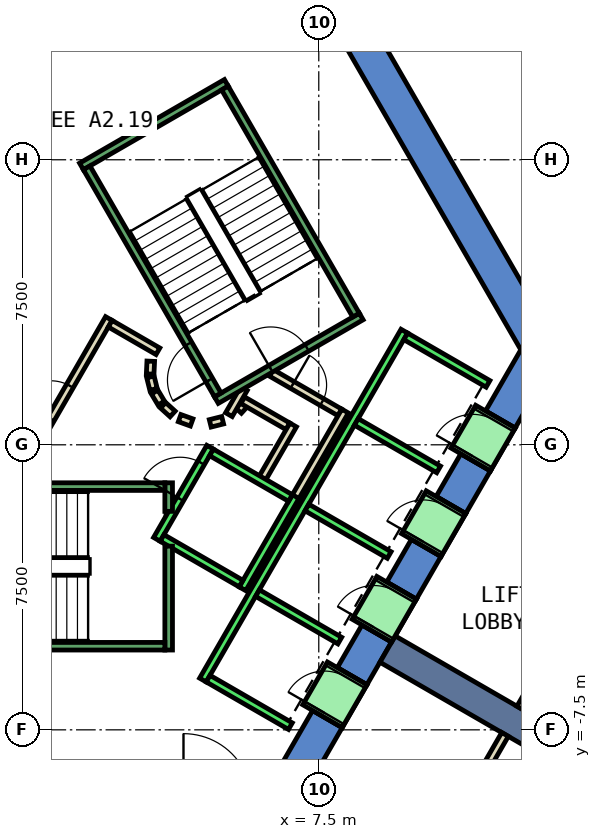
"""IFC4 building model, lengths in metres.
Left out: names, types, materials, properties, quantities, classifications, styles, units other than length and angle.
Written with IfcOpenShell. Run it as: python <this file> out.ifc"""

import sys

from ifc_helpers import new_model, si_unit, direction, frame, frame_2d, origin, place, context, subcontext, project, spatial, polyline, rectangle, outline, extrude, element, fill, save


model = new_model("IFC4")
c1 = context("Model", 3, precision=1e-05, world=origin(), true_north=direction((0.0, 1.0)))
c2 = subcontext(c1, "Body", "Model", "MODEL_VIEW")
j1 = project(units=[si_unit("LENGTHUNIT", "METRE"), si_unit("PLANEANGLEUNIT", "RADIAN")], contexts=[c1])
p1 = place(None, origin())
s1 = spatial("IfcSite", under=j1, at=p1, CompositionType="ELEMENT")
p2 = place(p1, origin())
s2 = spatial("IfcBuilding", under=s1, at=p2, CompositionType="ELEMENT")
p3 = place(p2, frame((0.0, 0.0, 86.6)))
s3 = spatial("IfcBuildingStorey", under=s2, at=p3, CompositionType="ELEMENT", Elevation=86.6)
p4 = place(p3, frame((0.0, 0.0, -0.6)))
e1 = element("IfcWall", 1, at=p4, inside=s3, PredefinedType="SHEAR", context=c2, shape_type="SweptSolid", body=[
    extrude(outline(polyline([(8.517, 11.748), (7.738, 11.298), (12.817, 2.5), (13.856, 2.5), (8.517, 11.748)])), origin(), (0.0, 0.0, 1.0), 4.4),
])
p5 = place(p3, frame((0.0, 0.0, -0.6)))
e2 = element("IfcWall", 2, at=p5, inside=s3, PredefinedType="SHEAR", context=c2, shape_type="SweptSolid", body=[
    extrude(outline(polyline([(8.117, -7.44), (7.338, -6.99), (6.409, -8.6), (6.928, -9.5), (8.117, -7.44)])), origin(), (0.0, 0.0, 1.0), 4.4),
])
p6 = place(p3, frame((0.0, 0.0, -0.6)))
e3 = element("IfcWall", 3, at=p6, inside=s3, PredefinedType="SHEAR", context=c2, shape_type="SweptSolid", body=[
    extrude(outline(polyline([(9.417, -5.189), (8.638, -4.739), (7.988, -5.864), (8.767, -6.314), (9.417, -5.189)])), origin(), (0.0, 0.0, 1.0), 4.4),
])
p7 = place(p3, frame((0.0, 0.0, -0.6)))
e4 = element("IfcWall", 4, at=p7, inside=s3, PredefinedType="SHEAR", context=c2, shape_type="SweptSolid", body=[
    extrude(outline(polyline([(10.717, -2.937), (9.938, -2.487), (9.288, -3.613), (10.067, -4.063), (10.717, -2.937)])), origin(), (0.0, 0.0, 1.0), 4.4),
])
p8 = place(p3, frame((0.0, 0.0, -0.6)))
e5 = element("IfcWall", 5, at=p8, inside=s3, PredefinedType="SHEAR", context=c2, shape_type="SweptSolid", body=[
    extrude(outline(polyline([(12.017, -0.686), (11.238, -0.236), (10.588, -1.361), (11.367, -1.811), (12.017, -0.686)])), origin(), (0.0, 0.0, 1.0), 4.4),
])
p9 = place(p3, frame((0.0, 0.0, -0.6)))
e6 = element("IfcWall", 6, at=p9, inside=s3, PredefinedType="SHEAR", context=c2, shape_type="SweptSolid", body=[
    extrude(outline(polyline([(11.888, 0.89), (12.667, 0.44), (13.856, 2.5), (12.817, 2.5), (11.888, 0.89)])), origin(), (0.0, 0.0, 1.0), 4.4),
])
p10 = place(p3, frame((0.0, 0.0, 3.6)))
e7 = element("IfcWall", 7, at=p10, inside=s3, PredefinedType="SHEAR", context=c2, shape_type="SweptSolid", body=[
    extrude(outline(polyline([(8.767, -6.314), (7.988, -5.864), (7.338, -6.99), (8.117, -7.44), (8.767, -6.314)])), origin(), (0.0, 0.0, 1.0), 0.2),
])
p11 = place(p3, frame((0.0, 0.0, 3.6)))
e8 = element("IfcWall", 8, at=p11, inside=s3, PredefinedType="SHEAR", context=c2, shape_type="SweptSolid", body=[
    extrude(outline(polyline([(10.067, -4.063), (9.288, -3.613), (8.638, -4.739), (9.417, -5.189), (10.067, -4.063)])), origin(), (0.0, 0.0, 1.0), 0.2),
])
p12 = place(p3, frame((0.0, 0.0, 3.6)))
e9 = element("IfcWall", 9, at=p12, inside=s3, PredefinedType="SHEAR", context=c2, shape_type="SweptSolid", body=[
    extrude(outline(polyline([(11.367, -1.811), (10.588, -1.361), (9.938, -2.487), (10.717, -2.937), (11.367, -1.811)])), origin(), (0.0, 0.0, 1.0), 0.2),
])
p13 = place(p3, frame((0.0, 0.0, 3.6)))
e10 = element("IfcWall", 10, at=p13, inside=s3, PredefinedType="SHEAR", context=c2, shape_type="SweptSolid", body=[
    extrude(outline(polyline([(12.667, 0.44), (11.888, 0.89), (11.238, -0.236), (12.017, -0.686), (12.667, 0.44)])), origin(), (0.0, 0.0, 1.0), 0.2),
])
p14 = place(p3, frame((9.31, -5.375, -0.6), z_axis=(0.0, 0.0, 1.0), x_axis=(0.866017533419, -0.500013631625, 0.0)))
e11 = element("IfcWall", 11, at=p14, inside=s3, PredefinedType="SHEAR", context=c2, shape_type="SweptSolid", body=[
    extrude(rectangle(XDim=9.0, YDim=0.8, at=frame_2d((4.5, 0.0))), origin(), (0.0, 0.0, 1.0), 4.4),
])
p15 = place(p3, frame((12.652, 15.602, 0.0), z_axis=(0.0, 0.0, 1.0), x_axis=(0.504914693075, -0.863169249172, 0.0)))
e12 = element("IfcWall", 12, at=p15, inside=s3, PredefinedType="PARTITIONING", context=c2, shape_type="SweptSolid", body=[
    extrude(rectangle(XDim=7.11, YDim=0.2, at=frame_2d((3.555, 0.0))), origin(), (0.0, 0.0, 1.0), 3.8),
])
p16 = place(p15, frame((3.13, 0.0, 0.0)))
e13 = element("IfcOpeningElement", 13, at=p16, cuts=e12, PredefinedType="OPENING", context=c2, shape_type="SweptSolid", body=[
    extrude(rectangle(XDim=1.0, YDim=2.1, at=frame_2d((0.5, 1.05))), frame((0.0, 0.11, 0.0), z_axis=(0.0, -1.0, 0.0), x_axis=(1.0, 0.0, 0.0)), (0.0, 0.0, 1.0), 0.22),
])
p17 = place(p3, frame((5.39, 0.898, 0.0), z_axis=(0.0, 0.0, 1.0), x_axis=(0.673828488714, 0.738887791073, 0.0)))
e14 = element("IfcWall", 14, at=p17, inside=s3, PredefinedType="PARTITIONING", context=c2, shape_type="SweptSolid", body=[
    extrude(rectangle(XDim=0.263, YDim=0.2, at=frame_2d((0.131, 0.0))), origin(), (0.0, 0.0, 1.0), 3.8),
])
p18 = place(p3, frame((5.499, 1.172, 0.0), z_axis=(0.0, 0.0, 1.0), x_axis=(0.866333505267, -0.499465972466, 0.0)))
e15 = element("IfcWall", 15, at=p18, inside=s3, PredefinedType="PARTITIONING", context=c2, shape_type="SweptSolid", body=[
    extrude(rectangle(XDim=1.374, YDim=0.2, at=frame_2d((0.687, 0.0))), origin(), (0.0, 0.0, 1.0), 3.8),
])
p19 = place(p3, frame((6.826, 0.522, 0.0), z_axis=(0.0, 0.0, 1.0), x_axis=(-0.500016722714, -0.866015748706, 0.0)))
e16 = element("IfcWall", 16, at=p19, inside=s3, PredefinedType="PARTITIONING", context=c2, shape_type="SweptSolid", body=[
    extrude(rectangle(XDim=1.7, YDim=0.2, at=frame_2d((0.85, 0.0))), origin(), (0.0, 0.0, 1.0), 3.8),
])
p20 = place(p3, frame((6.25, 1.894, 0.0), z_axis=(0.0, 0.0, 1.0), x_axis=(0.866043184279, -0.499969202016, 0.0)))
e17 = element("IfcWall", 17, at=p20, inside=s3, PredefinedType="PARTITIONING", context=c2, shape_type="SweptSolid", body=[
    extrude(rectangle(XDim=2.084, YDim=0.2, at=frame_2d((1.042, 0.0))), origin(), (0.0, 0.0, 1.0), 3.8),
])
p21 = place(p20, frame((0.642, 0.0, 0.0)))
e18 = element("IfcOpeningElement", 18, at=p21, cuts=e17, PredefinedType="OPENING", context=c2, shape_type="SweptSolid", body=[
    extrude(rectangle(XDim=0.9, YDim=2.1, at=frame_2d((0.45, 1.05))), frame((0.0, 0.11, 0.0), z_axis=(0.0, -1.0, 0.0), x_axis=(1.0, 0.0, 0.0)), (0.0, 0.0, 1.0), 0.22),
])
p22 = place(p3, frame((8.192, 0.888, 0.0), z_axis=(0.0, 0.0, 1.0), x_axis=(-0.499940625693, -0.866059680843, 0.0)))
e19 = element("IfcWall", 19, at=p22, inside=s3, PredefinedType="PARTITIONING", context=c2, shape_type="SweptSolid", body=[
    extrude(rectangle(XDim=2.68, YDim=0.2, at=frame_2d((1.34, 0.0))), origin(), (0.0, 0.0, 1.0), 3.8),
])
p23 = place(p3, frame((5.135, 0.793, 0.0), z_axis=(0.0, 0.0, 1.0), x_axis=(0.499526442893, 0.866298639529, 0.0)))
e20 = element("IfcWall", 20, at=p23, inside=s3, PredefinedType="PARTITIONING", context=c2, shape_type="SweptSolid", body=[
    extrude(rectangle(XDim=0.791, YDim=0.2, at=frame_2d((0.396, 0.0))), origin(), (0.0, 0.0, 1.0), 3.8),
])
p24 = place(p3, frame((-0.52, -1.0, 0.0), z_axis=(0.0, 0.0, 1.0), x_axis=(0.50011622646, 0.865958290007, 0.0)))
e21 = element("IfcWall", 21, at=p24, inside=s3, PredefinedType="PARTITIONING", context=c2, shape_type="SweptSolid", body=[
    extrude(rectangle(XDim=4.991, YDim=0.2, at=frame_2d((2.496, 0.0))), origin(), (0.0, 0.0, 1.0), 3.8),
])
p25 = place(p24, frame((1.945, 0.0, 0.0)))
e22 = element("IfcOpeningElement", 22, at=p25, cuts=e21, PredefinedType="OPENING", context=c2, shape_type="SweptSolid", body=[
    extrude(rectangle(XDim=1.0, YDim=2.1, at=frame_2d((0.5, 1.05))), frame((0.0, 0.11, 0.0), z_axis=(0.0, -1.0, 0.0), x_axis=(1.0, 0.0, 0.0)), (0.0, 0.0, 1.0), 0.22),
])
p26 = place(p3, frame((2.012, 3.186, 0.0), z_axis=(0.0, 0.0, 1.0), x_axis=(0.865891012941, -0.500232699559, 0.0)))
e23 = element("IfcWall", 23, at=p26, inside=s3, PredefinedType="PARTITIONING", context=c2, shape_type="SweptSolid", body=[
    extrude(rectangle(XDim=1.449, YDim=0.2, at=frame_2d((0.725, 0.0))), origin(), (0.0, 0.0, 1.0), 3.8),
])
p27 = place(p3, frame((3.079, 2.199, 0.0), z_axis=(0.0, 0.0, 1.0), x_axis=(-0.047771483479, -0.998858290933, 0.0)))
e24 = element("IfcWall", 24, at=p27, inside=s3, PredefinedType="PARTITIONING", context=c2, shape_type="SweptSolid", body=[
    extrude(rectangle(XDim=0.337, YDim=0.2, at=frame_2d((0.169, 0.0))), origin(), (0.0, 0.0, 1.0), 3.8),
])
p28 = place(p3, frame((3.07, 1.786, 0.0), z_axis=(0.0, 0.0, 1.0), x_axis=(0.242705583207, -0.970099994784, 0.0)))
e25 = element("IfcWall", 25, at=p28, inside=s3, PredefinedType="PARTITIONING", context=c2, shape_type="SweptSolid", body=[
    extrude(rectangle(XDim=0.338, YDim=0.2, at=frame_2d((0.169, 0.0))), origin(), (0.0, 0.0, 1.0), 3.8),
])
for number, where, z_axis, x_axis in (
    (26, (3.182, 1.388, 0.0), (0.0, 0.0, 1.0), (0.512, -0.859, 0.0)),
    (27, (3.404, 1.039, 0.0), (0.0, 0.0, 1.0), (0.74, -0.672, 0.0)),
):
    element("IfcWall", number, at=place(p3, frame(where, z_axis=z_axis, x_axis=x_axis)), inside=s3, PredefinedType="PARTITIONING", context=c2, shape_type="SweptSolid", body=[
        extrude(rectangle(XDim=0.338, YDim=0.2, at=frame_2d((0.169, 0.0))), origin(), (0.0, 0.0, 1.0), 3.8),
    ])
p29 = place(p3, frame((3.838, 0.702, 0.0), z_axis=(0.0, 0.0, 1.0), x_axis=(0.941035081519, -0.338308993895, 0.0)))
e28 = element("IfcWall", 28, at=p29, inside=s3, PredefinedType="PARTITIONING", context=c2, shape_type="SweptSolid", body=[
    extrude(rectangle(XDim=0.337, YDim=0.2, at=frame_2d((0.168, 0.0))), origin(), (0.0, 0.0, 1.0), 3.8),
])
p30 = place(p3, frame((4.644, 0.564, 0.0), z_axis=(0.0, 0.0, 1.0), x_axis=(0.969929076366, 0.243387729394, 0.0)))
e29 = element("IfcWall", 29, at=p30, inside=s3, PredefinedType="PARTITIONING", context=c2, shape_type="SweptSolid", body=[
    extrude(rectangle(XDim=0.337, YDim=0.2, at=frame_2d((0.168, 0.0))), origin(), (0.0, 0.0, 1.0), 3.8),
])
p31 = place(p3, frame((18.009, 2.092, 0.0), z_axis=(0.0, 0.0, 1.0), x_axis=(-0.499980796252, -0.866036490789, 0.0)))
e30 = element("IfcWall", 30, at=p31, inside=s3, PredefinedType="PARTITIONING", context=c2, shape_type="SweptSolid", body=[
    extrude(rectangle(XDim=10.417, YDim=0.2, at=frame_2d((5.208, 0.0))), origin(), (0.0, 0.0, 1.0), 3.8),
])
p32 = place(p3, frame((12.401, -7.621, 0.0), z_axis=(0.0, 0.0, 1.0), x_axis=(-0.499983724212, -0.866034800411, 0.0)))
e31 = element("IfcWall", 31, at=p32, inside=s3, PredefinedType="PARTITIONING", context=c2, shape_type="SweptSolid", body=[
    extrude(rectangle(XDim=9.302, YDim=0.2, at=frame_2d((4.651, 0.0))), origin(), (0.0, 0.0, 1.0), 3.8),
])
p33 = place(p3, frame((3.24, -2.488, 0.0), z_axis=(0.0, 0.0, 1.0), x_axis=(0.49994636267, 0.866056369097, 0.0)))
e32 = element("IfcWall", 32, at=p33, inside=s3, PredefinedType="STANDARD", context=c2, shape_type="SweptSolid", body=[
    extrude(rectangle(XDim=2.8, YDim=0.2, at=frame_2d((1.4, 0.0))), origin(), (0.0, 0.0, 1.0), 3.8),
])
p34 = place(p33, frame((1.225, 0.0, 0.0)))
e33 = element("IfcOpeningElement", 33, at=p34, cuts=e32, PredefinedType="OPENING", context=c2, shape_type="SweptSolid", body=[
    extrude(rectangle(XDim=1.1, YDim=2.1, at=frame_2d((0.55, 1.05))), frame((0.0, 0.11, 0.0), z_axis=(0.0, -1.0, 0.0), x_axis=(1.0, 0.0, 0.0)), (0.0, 0.0, 1.0), 0.22),
])
p35 = place(p3, frame((5.492, -3.788, 0.0), z_axis=(0.0, 0.0, 1.0), x_axis=(0.500011755427, 0.866018616679, 0.0)))
e34 = element("IfcWall", 34, at=p35, inside=s3, PredefinedType="STANDARD", context=c2, shape_type="SweptSolid", body=[
    extrude(rectangle(XDim=2.8, YDim=0.2, at=frame_2d((1.4, 0.0))), origin(), (0.0, 0.0, 1.0), 3.8),
])
p36 = place(p3, frame((3.377, -2.452, 0.0), z_axis=(0.0, 0.0, 1.0), x_axis=(0.865955154139, -0.50012165622, 0.0)))
e35 = element("IfcWall", 35, at=p36, inside=s3, PredefinedType="STANDARD", context=c2, shape_type="SweptSolid", body=[
    extrude(rectangle(XDim=2.4, YDim=0.2, at=frame_2d((1.2, 0.0))), origin(), (0.0, 0.0, 1.0), 3.8),
])
p37 = place(p3, frame((4.677, -0.2, 0.0), z_axis=(0.0, 0.0, 1.0), x_axis=(0.865973769406, -0.500089422704, 0.0)))
e36 = element("IfcWall", 36, at=p37, inside=s3, PredefinedType="STANDARD", context=c2, shape_type="SweptSolid", body=[
    extrude(rectangle(XDim=2.399, YDim=0.2, at=frame_2d((1.2, 0.0))), origin(), (0.0, 0.0, 1.0), 3.8),
])
p38 = place(p3, frame((4.451, -6.19, 0.0), z_axis=(0.0, 0.0, 1.0), x_axis=(0.50000090737, 0.866024879913, 0.0)))
e37 = element("IfcWall", 37, at=p38, inside=s3, PredefinedType="STANDARD", context=c2, shape_type="SweptSolid", body=[
    extrude(rectangle(XDim=10.6, YDim=0.2, at=frame_2d((5.3, 0.0))), origin(), (0.0, 0.0, 1.0), 3.8),
])
for number, where, z_axis, x_axis in (
    (38, (4.588, -6.153, 0.0), (0.0, 0.0, 1.0), (0.866, -0.5, 0.0)),
    (39, (5.888, -3.902, 0.0), (0.0, 0.0, 1.0), (0.866, -0.5, 0.0)),
    (40, (7.188, -1.65, 0.0), (0.0, 0.0, 1.0), (0.866, -0.5, 0.0)),
    (41, (8.488, 0.602, 0.0), (0.0, 0.0, 1.0), (0.866, -0.5, 0.0)),
):
    element("IfcWall", number, at=place(p3, frame(where, z_axis=z_axis, x_axis=x_axis)), inside=s3, PredefinedType="STANDARD", context=c2, shape_type="SweptSolid", body=[
        extrude(rectangle(XDim=2.5, YDim=0.2, at=frame_2d((1.25, 0.0))), origin(), (0.0, 0.0, 1.0), 3.8),
    ])
p39 = place(p3, frame((9.788, 2.853, 0.0), z_axis=(0.0, 0.0, 1.0), x_axis=(0.865998541277, -0.500046524342, 0.0)))
e42 = element("IfcWall", 42, at=p39, inside=s3, PredefinedType="STANDARD", context=c2, shape_type="SweptSolid", body=[
    extrude(rectangle(XDim=2.5, YDim=0.2, at=frame_2d((1.25, 0.0))), origin(), (0.0, 0.0, 1.0), 3.8),
])
p40 = place(p3, frame((7.598, -7.14, 0.0), z_axis=(0.0, 0.0, 1.0), x_axis=(0.500362116554, 0.865816234728, 0.0)))
e43 = element("IfcWall", 43, at=p40, inside=s3, PredefinedType="STANDARD", context=c2, shape_type="SweptSolid", body=[
    extrude(rectangle(XDim=1.299, YDim=1.2, at=frame_2d((0.65, 0.0))), origin(), (0.0, 0.0, 1.0), 2.4),
])
p41 = place(p40, frame((0.1, 0.0, 0.0)))
e44 = element("IfcOpeningElement", 44, at=p41, cuts=e43, PredefinedType="OPENING", context=c2, shape_type="SweptSolid", body=[
    extrude(rectangle(XDim=1.1, YDim=2.3, at=frame_2d((0.55, 1.15))), frame((0.0, 0.61, 0.0), z_axis=(0.0, -1.0, 0.0), x_axis=(1.0, 0.0, 0.0)), (0.0, 0.0, 1.0), 1.22),
])
p42 = place(p3, frame((8.898, -4.889, 0.0), z_axis=(0.0, 0.0, 1.0), x_axis=(0.500036693733, 0.866004217611, 0.0)))
e45 = element("IfcWall", 45, at=p42, inside=s3, PredefinedType="STANDARD", context=c2, shape_type="SweptSolid", body=[
    extrude(rectangle(XDim=1.3, YDim=1.2, at=frame_2d((0.65, 0.0))), origin(), (0.0, 0.0, 1.0), 2.4),
])
p43 = place(p42, frame((0.1, 0.0, 0.0)))
e46 = element("IfcOpeningElement", 46, at=p43, cuts=e45, PredefinedType="OPENING", context=c2, shape_type="SweptSolid", body=[
    extrude(rectangle(XDim=1.1, YDim=2.3, at=frame_2d((0.55, 1.15))), frame((0.0, 0.61, 0.0), z_axis=(0.0, -1.0, 0.0), x_axis=(1.0, 0.0, 0.0)), (0.0, 0.0, 1.0), 1.22),
])
p44 = place(p3, frame((10.198, -2.637, 0.0), z_axis=(0.0, 0.0, 1.0), x_axis=(0.49989585183, 0.866085525409, 0.0)))
e47 = element("IfcWall", 47, at=p44, inside=s3, PredefinedType="STANDARD", context=c2, shape_type="SweptSolid", body=[
    extrude(rectangle(XDim=1.3, YDim=1.2, at=frame_2d((0.65, 0.0))), origin(), (0.0, 0.0, 1.0), 2.4),
])
p45 = place(p44, frame((0.1, 0.0, 0.0)))
e48 = element("IfcOpeningElement", 48, at=p45, cuts=e47, PredefinedType="OPENING", context=c2, shape_type="SweptSolid", body=[
    extrude(rectangle(XDim=1.1, YDim=2.3, at=frame_2d((0.55, 1.15))), frame((0.0, 0.61, 0.0), z_axis=(0.0, -1.0, 0.0), x_axis=(1.0, 0.0, 0.0)), (0.0, 0.0, 1.0), 1.22),
])
p46 = place(p3, frame((11.498, -0.385, 0.0), z_axis=(0.0, 0.0, 1.0), x_axis=(0.500221244143, 0.865897630733, 0.0)))
e49 = element("IfcWall", 49, at=p46, inside=s3, PredefinedType="STANDARD", context=c2, shape_type="SweptSolid", body=[
    extrude(rectangle(XDim=1.299, YDim=1.2, at=frame_2d((0.65, 0.0))), origin(), (0.0, 0.0, 1.0), 2.4),
])
p47 = place(p46, frame((0.1, 0.0, 0.0)))
e50 = element("IfcOpeningElement", 50, at=p47, cuts=e49, PredefinedType="OPENING", context=c2, shape_type="SweptSolid", body=[
    extrude(rectangle(XDim=1.1, YDim=2.3, at=frame_2d((0.55, 1.15))), frame((0.0, 0.61, 0.0), z_axis=(0.0, -1.0, 0.0), x_axis=(1.0, 0.0, 0.0)), (0.0, 0.0, 1.0), 1.22),
])
p48 = place(p3, frame((3.55, -2.667, 0.0), z_axis=(0.0, 0.0, 1.0), x_axis=(0.0, -1.0, 0.0)))
e51 = element("IfcWall", 51, at=p48, inside=s3, PredefinedType="STANDARD", context=c2, shape_type="SweptSolid", body=[
    extrude(rectangle(XDim=2.733, YDim=0.2, at=frame_2d((1.366, 0.0))), origin(), (0.0, 0.0, 1.0), 3.8),
])
p49 = place(p3, frame((3.55, -1.0, 0.0), z_axis=(0.0, 0.0, 1.0), x_axis=(0.0, -1.0, 0.0)))
e52 = element("IfcWall", 52, at=p49, inside=s3, PredefinedType="STANDARD", context=c2, shape_type="SweptSolid", body=[
    extrude(rectangle(XDim=0.751, YDim=0.2, at=frame_2d((0.375, 0.0))), origin(), (0.0, 0.0, 1.0), 3.8),
])
p50 = place(p3, frame((-3.45, -1.1, 0.0), z_axis=(0.0, 0.0, 1.0), x_axis=(1.0, 0.0, 0.0)))
e53 = element("IfcWall", 53, at=p50, inside=s3, PredefinedType="STANDARD", context=c2, shape_type="SweptSolid", body=[
    extrude(rectangle(XDim=6.9, YDim=0.2, at=frame_2d((3.45, 0.0))), origin(), (0.0, 0.0, 1.0), 3.8),
])
p51 = place(p50, frame((0.45, 0.0, 0.0)))
e54 = element("IfcOpeningElement", 54, at=p51, cuts=e53, PredefinedType="OPENING", context=c2, shape_type="SweptSolid", body=[
    extrude(rectangle(XDim=1.1, YDim=2.2, at=frame_2d((0.55, 1.1))), frame((0.0, 0.11, 0.0), z_axis=(0.0, -1.0, 0.0), x_axis=(1.0, 0.0, 0.0)), (0.0, 0.0, 1.0), 0.22),
])
p52 = place(p3, frame((-3.45, -5.3, 0.0), z_axis=(0.0, 0.0, 1.0), x_axis=(1.0, 0.0, 0.0)))
e55 = element("IfcWall", 55, at=p52, inside=s3, PredefinedType="STANDARD", context=c2, shape_type="SweptSolid", body=[
    extrude(rectangle(XDim=6.9, YDim=0.2, at=frame_2d((3.45, 0.0))), origin(), (0.0, 0.0, 1.0), 3.8),
])
p53 = place(p3, frame((4.806, 1.176, 0.0), z_axis=(0.0, 0.0, 1.0), x_axis=(0.866059941101, 0.499940174841, 0.0)))
e56 = element("IfcWall", 56, at=p53, inside=s3, PredefinedType="STANDARD", context=c2, shape_type="SweptSolid", body=[
    extrude(rectangle(XDim=4.4, YDim=0.2, at=frame_2d((2.2, 0.0))), origin(), (0.0, 0.0, 1.0), 3.8),
])
p54 = place(p53, frame((1.65, 0.0, 0.0)))
e57 = element("IfcOpeningElement", 57, at=p54, cuts=e56, PredefinedType="OPENING", context=c2, shape_type="SweptSolid", body=[
    extrude(rectangle(XDim=1.1, YDim=2.2, at=frame_2d((0.55, 1.1))), frame((0.0, 0.11, 0.0), z_axis=(0.0, -1.0, 0.0), x_axis=(1.0, 0.0, 0.0)), (0.0, 0.0, 1.0), 0.22),
])
p55 = place(p3, frame((1.256, 7.324, 0.0), z_axis=(0.0, 0.0, 1.0), x_axis=(0.866046073146, 0.499964197906, 0.0)))
e58 = element("IfcWall", 58, at=p55, inside=s3, PredefinedType="STANDARD", context=c2, shape_type="SweptSolid", body=[
    extrude(rectangle(XDim=4.4, YDim=0.2, at=frame_2d((2.2, 0.0))), origin(), (0.0, 0.0, 1.0), 3.8),
])
p56 = place(p3, frame((4.843, 1.312, 0.0), z_axis=(0.0, 0.0, 1.0), x_axis=(-0.499963383562, 0.866046543262, 0.0)))
e59 = element("IfcWall", 59, at=p56, inside=s3, PredefinedType="STANDARD", context=c2, shape_type="SweptSolid", body=[
    extrude(rectangle(XDim=6.9, YDim=0.2, at=frame_2d((3.45, 0.0))), origin(), (0.0, 0.0, 1.0), 3.8),
])
p57 = place(p56, frame((0.45, 0.0, 0.0)))
e60 = element("IfcOpeningElement", 60, at=p57, cuts=e59, PredefinedType="OPENING", context=c2, shape_type="SweptSolid", body=[
    extrude(rectangle(XDim=1.1, YDim=2.2, at=frame_2d((0.55, 1.1))), frame((0.0, 0.11, 0.0), z_axis=(0.0, -1.0, 0.0), x_axis=(1.0, 0.0, 0.0)), (0.0, 0.0, 1.0), 0.22),
])
p58 = place(p3, frame((8.48, 3.412, 0.0), z_axis=(0.0, 0.0, 1.0), x_axis=(-0.499978703459, 0.866037698999, 0.0)))
e61 = element("IfcWall", 61, at=p58, inside=s3, PredefinedType="STANDARD", context=c2, shape_type="SweptSolid", body=[
    extrude(rectangle(XDim=6.9, YDim=0.2, at=frame_2d((3.45, 0.0))), origin(), (0.0, 0.0, 1.0), 3.8),
])
p59 = place(p25, origin())
e62 = element("IfcDoor", 62, at=p59, inside=s3, OperationType="SINGLE_SWING_LEFT", PredefinedType="DOOR", context=c2, shape_type="SweptSolid", body=[
    extrude(rectangle(XDim=1.0, YDim=2.1, at=frame_2d((0.5, 1.05))), frame((0.0, 0.025, 0.0), z_axis=(0.0, -1.0, 0.0), x_axis=(1.0, 0.0, 0.0)), (0.0, 0.0, 1.0), 0.05),
])
fill(e22, e62)
p60 = place(p21, origin())
e63 = element("IfcDoor", 63, at=p60, inside=s3, OperationType="SINGLE_SWING_LEFT", PredefinedType="DOOR", context=c2, shape_type="SweptSolid", body=[
    extrude(rectangle(XDim=0.9, YDim=2.1, at=frame_2d((0.45, 1.05))), frame((0.0, 0.025, 0.0), z_axis=(0.0, -1.0, 0.0), x_axis=(1.0, 0.0, 0.0)), (0.0, 0.0, 1.0), 0.05),
])
fill(e18, e63)
p61 = place(p41, origin())
e64 = element("IfcDoor", 64, at=p61, inside=s3, OperationType="SLIDING_TO_LEFT", PredefinedType="DOOR", context=c2, shape_type="SweptSolid", body=[
    extrude(rectangle(XDim=1.1, YDim=2.3, at=frame_2d((0.55, 1.15))), frame((0.0, 0.025, 0.0), z_axis=(0.0, -1.0, 0.0), x_axis=(1.0, 0.0, 0.0)), (0.0, 0.0, 1.0), 0.05),
])
fill(e44, e64)
p62 = place(p43, origin())
e65 = element("IfcDoor", 65, at=p62, inside=s3, OperationType="SLIDING_TO_LEFT", PredefinedType="DOOR", context=c2, shape_type="SweptSolid", body=[
    extrude(rectangle(XDim=1.1, YDim=2.3, at=frame_2d((0.55, 1.15))), frame((0.0, 0.025, 0.0), z_axis=(0.0, -1.0, 0.0), x_axis=(1.0, 0.0, 0.0)), (0.0, 0.0, 1.0), 0.05),
])
fill(e46, e65)
p63 = place(p45, origin())
e66 = element("IfcDoor", 66, at=p63, inside=s3, OperationType="SLIDING_TO_LEFT", PredefinedType="DOOR", context=c2, shape_type="SweptSolid", body=[
    extrude(rectangle(XDim=1.1, YDim=2.3, at=frame_2d((0.55, 1.15))), frame((0.0, 0.025, 0.0), z_axis=(0.0, -1.0, 0.0), x_axis=(1.0, 0.0, 0.0)), (0.0, 0.0, 1.0), 0.05),
])
fill(e48, e66)
p64 = place(p47, origin())
e67 = element("IfcDoor", 67, at=p64, inside=s3, OperationType="SLIDING_TO_LEFT", PredefinedType="DOOR", context=c2, shape_type="SweptSolid", body=[
    extrude(rectangle(XDim=1.1, YDim=2.3, at=frame_2d((0.55, 1.15))), frame((0.0, 0.025, 0.0), z_axis=(0.0, -1.0, 0.0), x_axis=(1.0, 0.0, 0.0)), (0.0, 0.0, 1.0), 0.05),
])
fill(e50, e67)
p65 = place(p34, origin())
e68 = element("IfcDoor", 68, at=p65, inside=s3, OperationType="SLIDING_TO_LEFT", PredefinedType="DOOR", context=c2, shape_type="SweptSolid", body=[
    extrude(rectangle(XDim=1.1, YDim=2.1, at=frame_2d((0.55, 1.05))), frame((0.0, 0.025, 0.0), z_axis=(0.0, -1.0, 0.0), x_axis=(1.0, 0.0, 0.0)), (0.0, 0.0, 1.0), 0.05),
])
fill(e33, e68)
p66 = place(p57, origin())
e69 = element("IfcDoor", 69, at=p66, inside=s3, OperationType="SINGLE_SWING_LEFT", PredefinedType="DOOR", context=c2, shape_type="SweptSolid", body=[
    extrude(rectangle(XDim=1.1, YDim=2.2, at=frame_2d((0.55, 1.1))), frame((0.0, 0.025, 0.0), z_axis=(0.0, -1.0, 0.0), x_axis=(1.0, 0.0, 0.0)), (0.0, 0.0, 1.0), 0.05),
])
fill(e60, e69)
p67 = place(p54, origin())
e70 = element("IfcDoor", 70, at=p67, inside=s3, OperationType="SINGLE_SWING_LEFT", PredefinedType="DOOR", context=c2, shape_type="SweptSolid", body=[
    extrude(rectangle(XDim=1.1, YDim=2.2, at=frame_2d((0.55, 1.1))), frame((0.0, 0.025, 0.0), z_axis=(0.0, -1.0, 0.0), x_axis=(1.0, 0.0, 0.0)), (0.0, 0.0, 1.0), 0.05),
])
fill(e57, e70)
save(model, sys.argv[1])
